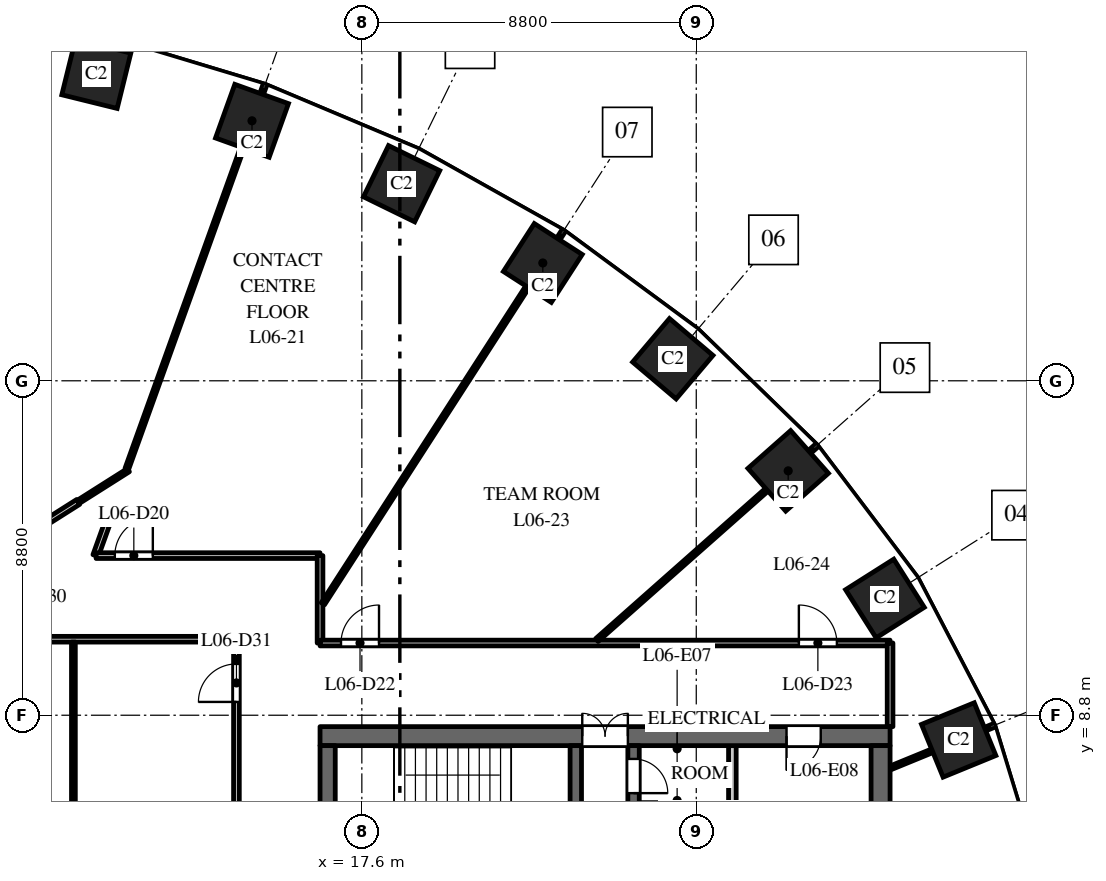
"""IFC4 building model, lengths in metres.
Left out: names, types, materials, properties, quantities, classifications, styles, units other than length and angle.
Written with IfcOpenShell. Run it as: python <this file> out.ifc"""

import sys

from ifc_helpers import new_model, si_unit, direction, frame, frame_2d, origin, origin_2d, place, context, subcontext, project, spatial, rectangle, extrude, element, fill, save


model = new_model("IFC4")
c1 = context("Model", 3, precision=1e-05, world=origin(), true_north=direction((0.0, 1.0)))
c2 = subcontext(c1, "Body", "Model", "MODEL_VIEW")
j1 = project(units=[si_unit("LENGTHUNIT", "METRE"), si_unit("PLANEANGLEUNIT", "RADIAN")], contexts=[c1])
p1 = place(None, origin())
s1 = spatial("IfcSite", under=j1, at=p1, CompositionType="ELEMENT")
p2 = place(p1, origin())
s2 = spatial("IfcBuilding", under=s1, at=p2, CompositionType="ELEMENT")
p3 = place(p2, frame((0.0, 0.0, 34.5)))
s3 = spatial("IfcBuildingStorey", under=s2, at=p3, CompositionType="ELEMENT", Elevation=34.5)
for number, where, z_axis, x_axis in (
    (1, (33.305, 8.149, 0.0), (0.0, 0.0, 1.0), (-0.379, 0.925, 0.0)),
    (2, (31.365, 11.871, 0.0), (0.0, 0.0, 1.0), (-0.535, 0.845, 0.0)),
    (3, (28.819, 15.23, 0.0), (0.0, 0.0, 1.0), (-0.663, 0.749, 0.0)),
    (4, (25.783, 18.18, 0.0), (0.0, 0.0, 1.0), (-0.763, 0.646, 0.0)),
    (5, (22.362, 20.7, 0.0), (0.0, 0.0, 1.0), (-0.84, 0.542, 0.0)),
    (6, (18.646, 22.785, 0.0), (0.0, 0.0, 1.0), (-0.898, 0.439, 0.0)),
    (7, (14.709, 24.441, 0.0), (0.0, 0.0, 1.0), (-0.941, 0.338, 0.0)),
    (8, (10.613, 25.674, 0.0), (0.0, 0.0, 1.0), (-0.971, 0.24, 0.0)),
):
    element("IfcColumn", number, at=place(p3, frame(where, z_axis=z_axis, x_axis=x_axis)), inside=s3, PredefinedType="COLUMN", context=c2, shape_type="SweptSolid", body=[
        extrude(rectangle(XDim=1.5, YDim=1.5, at=origin_2d()), origin(), (0.0, 0.0, 1.0), 4.0),
    ])
p4 = place(p3, frame((16.5, 8.25, 0.0), z_axis=(0.0, 0.0, 1.0), x_axis=(1.0, 0.0, 0.0)))
e9 = element("IfcWall", 9, at=p4, inside=s3, PredefinedType="SHEAR", context=c2, shape_type="SweptSolid", body=[
    extrude(rectangle(XDim=15.0, YDim=0.5, at=frame_2d((7.5, 0.0))), origin(), (0.0, 0.0, 1.0), 3.7),
])
p5 = place(p4, frame((6.9, 0.0, 0.0)))
e10 = element("IfcOpeningElement", 10, at=p5, cuts=e9, PredefinedType="OPENING", context=c2, shape_type="SweptSolid", body=[
    extrude(rectangle(XDim=1.2, YDim=2.1, at=frame_2d((0.6, 1.05))), frame((0.0, 0.26, 0.0), z_axis=(0.0, -1.0, 0.0), x_axis=(1.0, 0.0, 0.0)), (0.0, 0.0, 1.0), 0.52),
])
p6 = place(p4, frame((12.275, 0.0, 0.0)))
e11 = element("IfcOpeningElement", 11, at=p6, cuts=e9, PredefinedType="OPENING", context=c2, shape_type="SweptSolid", body=[
    extrude(rectangle(XDim=0.9, YDim=2.1, at=frame_2d((0.45, 1.05))), frame((0.0, 0.26, 0.0), z_axis=(0.0, -1.0, 0.0), x_axis=(1.0, 0.0, 0.0)), (0.0, 0.0, 1.0), 0.52),
])
p7 = place(p3, frame((24.75, -8.0, 0.0), z_axis=(0.0, 0.0, 1.0), x_axis=(0.0, 1.0, 0.0)))
e12 = element("IfcWall", 12, at=p7, inside=s3, PredefinedType="SHEAR", context=c2, shape_type="SweptSolid", body=[
    extrude(rectangle(XDim=16.0, YDim=0.3, at=frame_2d((8.0, 0.0))), origin(), (0.0, 0.0, 1.0), 3.7),
])
p8 = place(p7, frame((4.425, 0.0, 0.0)))
e13 = element("IfcOpeningElement", 13, at=p8, cuts=e12, PredefinedType="OPENING", context=c2, shape_type="SweptSolid", body=[
    extrude(rectangle(XDim=1.1, YDim=2.1, at=frame_2d((0.55, 1.05))), frame((0.0, 0.16, 0.0), z_axis=(0.0, -1.0, 0.0), x_axis=(1.0, 0.0, 0.0)), (0.0, 0.0, 1.0), 0.32),
])
p9 = place(p7, frame((7.45, 0.0, 0.0)))
e14 = element("IfcOpeningElement", 14, at=p9, cuts=e12, PredefinedType="OPENING", context=c2, shape_type="SweptSolid", body=[
    extrude(rectangle(XDim=1.1, YDim=2.1, at=frame_2d((0.55, 1.05))), frame((0.0, 0.16, 0.0), z_axis=(0.0, -1.0, 0.0), x_axis=(1.0, 0.0, 0.0)), (0.0, 0.0, 1.0), 0.32),
])
p10 = place(p7, frame((10.425, 0.0, 0.0)))
e15 = element("IfcOpeningElement", 15, at=p10, cuts=e12, PredefinedType="OPENING", context=c2, shape_type="SweptSolid", body=[
    extrude(rectangle(XDim=1.2, YDim=2.1, at=frame_2d((0.6, 1.05))), frame((0.0, 0.16, 0.0), z_axis=(0.0, -1.0, 0.0), x_axis=(1.0, 0.0, 0.0)), (0.0, 0.0, 1.0), 0.32),
])
p11 = place(p7, frame((13.125, 0.0, 0.0)))
e16 = element("IfcOpeningElement", 16, at=p11, cuts=e12, PredefinedType="OPENING", context=c2, shape_type="SweptSolid", body=[
    extrude(rectangle(XDim=0.9, YDim=2.1, at=frame_2d((0.45, 1.05))), frame((0.0, 0.16, 0.0), z_axis=(0.0, -1.0, 0.0), x_axis=(1.0, 0.0, 0.0)), (0.0, 0.0, 1.0), 0.32),
])
p12 = place(p7, frame((14.75, 0.0, 0.0)))
e17 = element("IfcOpeningElement", 17, at=p12, cuts=e12, PredefinedType="OPENING", context=c2, shape_type="SweptSolid", body=[
    extrude(rectangle(XDim=0.9, YDim=2.1, at=frame_2d((0.45, 1.05))), frame((0.0, 0.16, 0.0), z_axis=(0.0, -1.0, 0.0), x_axis=(1.0, 0.0, 0.0)), (0.0, 0.0, 1.0), 0.32),
])
p13 = place(p7, frame((1.35, 0.0, 0.0)))
e18 = element("IfcOpeningElement", 18, at=p13, cuts=e12, PredefinedType="OPENING", context=c2, shape_type="SweptSolid", body=[
    extrude(rectangle(XDim=0.9, YDim=2.1, at=frame_2d((0.45, 1.05))), frame((0.0, 0.16, 0.0), z_axis=(0.0, -1.0, 0.0), x_axis=(1.0, 0.0, 0.0)), (0.0, 0.0, 1.0), 0.32),
])
p14 = place(p3, frame((16.7, -8.0, 0.0), z_axis=(0.0, 0.0, 1.0), x_axis=(0.0, 1.0, 0.0)))
e19 = element("IfcWall", 19, at=p14, inside=s3, PredefinedType="SHEAR", context=c2, shape_type="SweptSolid", body=[
    extrude(rectangle(XDim=16.0, YDim=0.4, at=frame_2d((8.0, 0.0))), origin(), (0.0, 0.0, 1.0), 3.7),
])
p15 = place(p3, frame((31.25, -8.0, 0.0), z_axis=(0.0, 0.0, 1.0), x_axis=(0.0, 1.0, 0.0)))
e20 = element("IfcWall", 20, at=p15, inside=s3, PredefinedType="SHEAR", context=c2, shape_type="SweptSolid", body=[
    extrude(rectangle(XDim=16.0, YDim=0.5, at=frame_2d((8.0, 0.0))), origin(), (0.0, 0.0, 1.0), 3.7),
])
p16 = place(p3, frame((27.35, 4.75, 0.0), z_axis=(0.0, 0.0, 1.0), x_axis=(0.0, 1.0, 0.0)))
e21 = element("IfcWall", 21, at=p16, inside=s3, PredefinedType="PARTITIONING", context=c2, shape_type="SweptSolid", body=[
    extrude(rectangle(XDim=3.25, YDim=0.2, at=frame_2d((1.625, 0.0))), origin(), (0.0, 0.0, 1.0), 3.7),
])
p17 = place(p3, frame((23.23, 2.25, 0.0), z_axis=(0.0, 0.0, 1.0), x_axis=(0.0, 1.0, 0.0)))
e22 = element("IfcWall", 22, at=p17, inside=s3, PredefinedType="SHEAR", context=c2, shape_type="SweptSolid", body=[
    extrude(rectangle(XDim=5.75, YDim=0.3, at=frame_2d((2.875, 0.0))), origin(), (0.0, 0.0, 1.0), 3.7),
])
p18 = place(p17, frame((0.6, 0.0, 0.0)))
e23 = element("IfcOpeningElement", 23, at=p18, cuts=e22, PredefinedType="OPENING", context=c2, shape_type="SweptSolid", body=[
    extrude(rectangle(XDim=1.0, YDim=2.1, at=frame_2d((0.5, 1.05))), frame((0.0, 0.16, 0.0), z_axis=(0.0, -1.0, 0.0), x_axis=(1.0, 0.0, 0.0)), (0.0, 0.0, 1.0), 0.32),
])
p19 = place(p3, frame((-14.3, 10.8, 0.0), z_axis=(0.0, 0.0, 1.0), x_axis=(1.0, 0.0, 0.0)))
e24 = element("IfcWall", 24, at=p19, inside=s3, PredefinedType="PARTITIONING", context=c2, shape_type="SweptSolid", body=[
    extrude(rectangle(XDim=28.6, YDim=0.15, at=frame_2d((14.3, 0.0))), origin(), (0.0, 0.0, 1.0), 2.85),
])
p20 = place(p19, frame((10.66, 0.0, 0.0)))
e25 = element("IfcOpeningElement", 25, at=p20, cuts=e24, PredefinedType="OPENING", context=c2, shape_type="SweptSolid", body=[
    extrude(rectangle(XDim=1.0, YDim=2.1, at=frame_2d((0.5, 1.05))), frame((0.0, 0.085, 0.0), z_axis=(0.0, -1.0, 0.0), x_axis=(1.0, 0.0, 0.0)), (0.0, 0.0, 1.0), 0.17),
])
p21 = place(p19, frame((15.427, 0.0, 0.0)))
e26 = element("IfcOpeningElement", 26, at=p21, cuts=e24, PredefinedType="OPENING", context=c2, shape_type="SweptSolid", body=[
    extrude(rectangle(XDim=1.0, YDim=2.1, at=frame_2d((0.5, 1.05))), frame((0.0, 0.085, 0.0), z_axis=(0.0, -1.0, 0.0), x_axis=(1.0, 0.0, 0.0)), (0.0, 0.0, 1.0), 0.17),
])
p22 = place(p19, frame((22.693, 0.0, 0.0)))
e27 = element("IfcOpeningElement", 27, at=p22, cuts=e24, PredefinedType="OPENING", context=c2, shape_type="SweptSolid", body=[
    extrude(rectangle(XDim=1.0, YDim=2.1, at=frame_2d((0.5, 1.05))), frame((0.0, 0.085, 0.0), z_axis=(0.0, -1.0, 0.0), x_axis=(1.0, 0.0, 0.0)), (0.0, 0.0, 1.0), 0.17),
])
p23 = place(p3, frame((8.028, 13.077, 0.0), z_axis=(0.0, 0.0, 1.0), x_axis=(0.844718865656, 0.53521027457, 0.0)))
e28 = element("IfcWall", 28, at=p23, inside=s3, PredefinedType="PARTITIONING", context=c2, shape_type="SweptSolid", body=[
    extrude(rectangle(XDim=2.497, YDim=0.15, at=frame_2d((1.248, 0.0))), origin(), (0.0, 0.0, 1.0), 3.7),
])
p24 = place(p3, frame((10.01, -10.725, 0.0), z_axis=(0.0, 0.0, 1.0), x_axis=(0.0, 1.0, 0.0)))
e29 = element("IfcWall", 29, at=p24, inside=s3, PredefinedType="PARTITIONING", context=c2, shape_type="SweptSolid", body=[
    extrude(rectangle(XDim=21.45, YDim=0.1, at=frame_2d((10.725, 0.0))), origin(), (0.0, 0.0, 1.0), 2.75),
])
p25 = place(p3, frame((10.137, 14.413, 0.0), z_axis=(0.0, 0.0, 1.0), x_axis=(0.844849680057, 0.535003755228, 0.0)))
e30 = element("IfcWall", 30, at=p25, inside=s3, PredefinedType="PARTITIONING", context=c2, shape_type="SweptSolid", body=[
    extrude(rectangle(XDim=1.562, YDim=0.1, at=frame_2d((0.781, 0.0))), origin(), (0.0, 0.0, 1.0), 3.7),
])
p26 = place(p3, frame((10.595, 13.0, 0.0), z_axis=(0.0, 0.0, 1.0), x_axis=(0.338659506624, 0.940908995904, 0.0)))
e31 = element("IfcWall", 31, at=p26, inside=s3, PredefinedType="PARTITIONING", context=c2, shape_type="SweptSolid", body=[
    extrude(rectangle(XDim=0.865, YDim=0.15, at=frame_2d((0.433, 0.0))), origin(), (0.0, 0.0, 1.0), 3.7),
])
p27 = place(p3, frame((10.607, 13.0, 0.0), z_axis=(0.0, 0.0, 1.0), x_axis=(1.0, 0.0, 0.0)))
e32 = element("IfcWall", 32, at=p27, inside=s3, PredefinedType="PARTITIONING", context=c2, shape_type="SweptSolid", body=[
    extrude(rectangle(XDim=5.893, YDim=0.15, at=frame_2d((2.947, 0.0))), origin(), (0.0, 0.0, 1.0), 3.7),
])
p28 = place(p27, frame((0.493, 0.0, 0.0)))
e33 = element("IfcOpeningElement", 33, at=p28, cuts=e32, PredefinedType="OPENING", context=c2, shape_type="SweptSolid", body=[
    extrude(rectangle(XDim=1.0, YDim=2.1, at=frame_2d((0.5, 1.05))), frame((0.0, 0.085, 0.0), z_axis=(0.0, -1.0, 0.0), x_axis=(1.0, 0.0, 0.0)), (0.0, 0.0, 1.0), 0.17),
])
p29 = place(p3, frame((11.416, 15.282, 0.0), z_axis=(0.0, 0.0, 1.0), x_axis=(0.338364268616, 0.94101520802, 0.0)))
e34 = element("IfcWall", 34, at=p29, inside=s3, PredefinedType="PARTITIONING", context=c2, shape_type="SweptSolid", body=[
    extrude(rectangle(XDim=10.734, YDim=0.1, at=frame_2d((5.367, 0.0))), origin(), (0.0, 0.0, 1.0), 3.7),
])
p30 = place(p3, frame((14.3, -10.8, 0.0), z_axis=(0.0, 0.0, 1.0), x_axis=(0.0, 1.0, 0.0)))
e35 = element("IfcWall", 35, at=p30, inside=s3, PredefinedType="PARTITIONING", context=c2, shape_type="SweptSolid", body=[
    extrude(rectangle(XDim=21.6, YDim=0.15, at=frame_2d((10.8, 0.0))), origin(), (0.0, 0.0, 1.0), 2.75),
])
p31 = place(p30, frame((19.95, 0.0, 0.0)))
e36 = element("IfcOpeningElement", 36, at=p31, cuts=e35, PredefinedType="OPENING", context=c2, shape_type="SweptSolid", body=[
    extrude(rectangle(XDim=1.0, YDim=2.1, at=frame_2d((0.5, 1.05))), frame((0.0, 0.085, 0.0), z_axis=(0.0, -1.0, 0.0), x_axis=(1.0, 0.0, 0.0)), (0.0, 0.0, 1.0), 0.17),
])
p32 = place(p3, frame((16.5, 10.7, 0.0), z_axis=(0.0, 0.0, 1.0), x_axis=(0.0, 1.0, 0.0)))
e37 = element("IfcWall", 37, at=p32, inside=s3, PredefinedType="PARTITIONING", context=c2, shape_type="SweptSolid", body=[
    extrude(rectangle(XDim=2.3, YDim=0.15, at=frame_2d((1.15, 0.0))), origin(), (0.0, 0.0, 1.0), 3.7),
])
p33 = place(p3, frame((16.5, 10.7, 0.0), z_axis=(0.0, 0.0, 1.0), x_axis=(1.0, 0.0, 0.0)))
e38 = element("IfcWall", 38, at=p33, inside=s3, PredefinedType="PARTITIONING", context=c2, shape_type="SweptSolid", body=[
    extrude(rectangle(XDim=15.0, YDim=0.15, at=frame_2d((7.5, 0.0))), origin(), (0.0, 0.0, 1.0), 2.75),
])
p34 = place(p33, frame((0.552, 0.0, 0.0)))
e39 = element("IfcOpeningElement", 39, at=p34, cuts=e38, PredefinedType="OPENING", context=c2, shape_type="SweptSolid", body=[
    extrude(rectangle(XDim=1.0, YDim=2.1, at=frame_2d((0.5, 1.05))), frame((0.0, 0.085, 0.0), z_axis=(0.0, -1.0, 0.0), x_axis=(1.0, 0.0, 0.0)), (0.0, 0.0, 1.0), 0.17),
])
p35 = place(p33, frame((12.6, 0.0, 0.0)))
e40 = element("IfcOpeningElement", 40, at=p35, cuts=e38, PredefinedType="OPENING", context=c2, shape_type="SweptSolid", body=[
    extrude(rectangle(XDim=1.0, YDim=2.1, at=frame_2d((0.5, 1.05))), frame((0.0, 0.085, 0.0), z_axis=(0.0, -1.0, 0.0), x_axis=(1.0, 0.0, 0.0)), (0.0, 0.0, 1.0), 0.17),
])
p36 = place(p3, frame((16.575, 11.733, 0.0), z_axis=(0.0, 0.0, 1.0), x_axis=(0.54222594427, 0.840232720953, 0.0)))
e41 = element("IfcWall", 41, at=p36, inside=s3, PredefinedType="PARTITIONING", context=c2, shape_type="SweptSolid", body=[
    extrude(rectangle(XDim=11.674, YDim=0.1, at=frame_2d((5.837, 0.0))), origin(), (0.0, 0.0, 1.0), 3.7),
])
p37 = place(p3, frame((23.785, 10.778, 0.0), z_axis=(0.0, 0.0, 1.0), x_axis=(0.748985701008, 0.662586160198, 0.0)))
e42 = element("IfcWall", 42, at=p37, inside=s3, PredefinedType="PARTITIONING", context=c2, shape_type="SweptSolid", body=[
    extrude(rectangle(XDim=7.723, YDim=0.1, at=frame_2d((3.861, 0.0))), origin(), (0.0, 0.0, 1.0), 3.7),
])
p38 = place(p3, frame((31.5, 7.41, 0.0), z_axis=(0.0, 0.0, 1.0), x_axis=(0.925344112436, 0.379128307542, 0.0)))
e43 = element("IfcWall", 43, at=p38, inside=s3, PredefinedType="PARTITIONING", context=c2, shape_type="SweptSolid", body=[
    extrude(rectangle(XDim=2.954, YDim=0.1, at=frame_2d((1.477, 0.0))), origin(), (0.0, 0.0, 1.0), 3.7),
])
p39 = place(p3, frame((31.5, 8.5, 0.0), z_axis=(0.0, 0.0, 1.0), x_axis=(0.0, 1.0, 0.0)))
e44 = element("IfcWall", 44, at=p39, inside=s3, PredefinedType="PARTITIONING", context=c2, shape_type="SweptSolid", body=[
    extrude(rectangle(XDim=2.2, YDim=0.15, at=frame_2d((1.1, 0.0))), origin(), (0.0, 0.0, 1.0), 2.85),
])
p40 = place(p5, origin())
e45 = element("IfcDoor", 45, at=p40, inside=s3, OperationType="DOUBLE_DOOR_DOUBLE_SWING", PredefinedType="DOOR", context=c2, shape_type="SweptSolid", body=[
    extrude(rectangle(XDim=1.2, YDim=2.1, at=frame_2d((0.6, 1.05))), frame((0.0, 0.025, 0.0), z_axis=(0.0, -1.0, 0.0), x_axis=(1.0, 0.0, 0.0)), (0.0, 0.0, 1.0), 0.05),
])
fill(e10, e45)
p41 = place(p12, origin())
e46 = element("IfcDoor", 46, at=p41, inside=s3, OperationType="SINGLE_SWING_LEFT", PredefinedType="DOOR", context=c2, shape_type="SweptSolid", body=[
    extrude(rectangle(XDim=0.9, YDim=2.1, at=frame_2d((0.45, 1.05))), frame((0.0, 0.025, 0.0), z_axis=(0.0, -1.0, 0.0), x_axis=(1.0, 0.0, 0.0)), (0.0, 0.0, 1.0), 0.05),
])
fill(e17, e46)
p42 = place(p6, origin())
e47 = element("IfcDoor", 47, at=p42, inside=s3, OperationType="SINGLE_SWING_LEFT", PredefinedType="DOOR", context=c2, shape_type="SweptSolid", body=[
    extrude(rectangle(XDim=0.9, YDim=2.1, at=frame_2d((0.45, 1.05))), frame((0.0, 0.025, 0.0), z_axis=(0.0, -1.0, 0.0), x_axis=(1.0, 0.0, 0.0)), (0.0, 0.0, 1.0), 0.05),
])
fill(e11, e47)
p43 = place(p28, origin())
e48 = element("IfcDoor", 48, at=p43, inside=s3, OperationType="SINGLE_SWING_RIGHT", PredefinedType="DOOR", context=c2, shape_type="SweptSolid", body=[
    extrude(rectangle(XDim=1.0, YDim=2.1, at=frame_2d((0.5, 1.05))), frame((0.0, 0.025, 0.0), z_axis=(0.0, -1.0, 0.0), x_axis=(1.0, 0.0, 0.0)), (0.0, 0.0, 1.0), 0.05),
])
fill(e33, e48)
p44 = place(p34, origin())
e49 = element("IfcDoor", 49, at=p44, inside=s3, OperationType="SINGLE_SWING_RIGHT", PredefinedType="DOOR", context=c2, shape_type="SweptSolid", body=[
    extrude(rectangle(XDim=1.0, YDim=2.1, at=frame_2d((0.5, 1.05))), frame((0.0, 0.025, 0.0), z_axis=(0.0, -1.0, 0.0), x_axis=(1.0, 0.0, 0.0)), (0.0, 0.0, 1.0), 0.05),
])
fill(e39, e49)
p45 = place(p35, origin())
e50 = element("IfcDoor", 50, at=p45, inside=s3, OperationType="SINGLE_SWING_LEFT", PredefinedType="DOOR", context=c2, shape_type="SweptSolid", body=[
    extrude(rectangle(XDim=1.0, YDim=2.1, at=frame_2d((0.5, 1.05))), frame((0.0, 0.025, 0.0), z_axis=(0.0, -1.0, 0.0), x_axis=(1.0, 0.0, 0.0)), (0.0, 0.0, 1.0), 0.05),
])
fill(e40, e50)
p46 = place(p31, origin())
e51 = element("IfcDoor", 51, at=p46, inside=s3, OperationType="SINGLE_SWING_LEFT", PredefinedType="DOOR", context=c2, shape_type="SweptSolid", body=[
    extrude(rectangle(XDim=1.0, YDim=2.1, at=frame_2d((0.5, 1.05))), frame((0.0, 0.025, 0.0), z_axis=(0.0, -1.0, 0.0), x_axis=(1.0, 0.0, 0.0)), (0.0, 0.0, 1.0), 0.05),
])
fill(e36, e51)
save(model, sys.argv[1])
